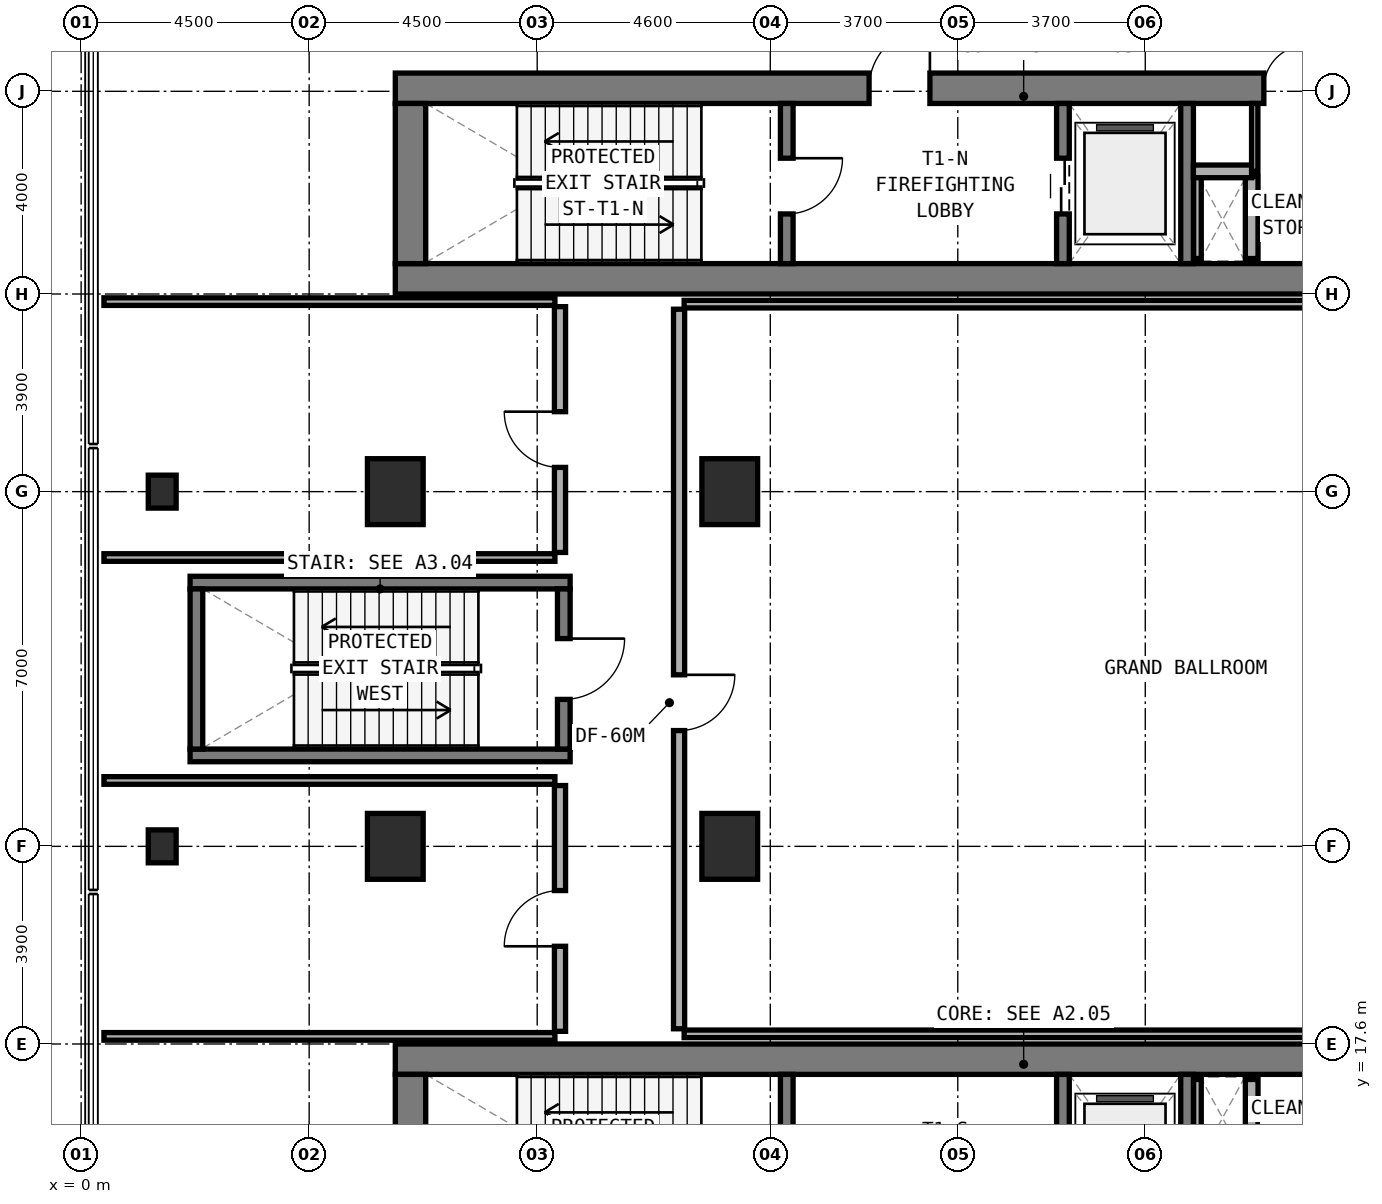
"""IFC4 building model, lengths in metres.
Left out: names, types, materials, properties, quantities, classifications, styles, units other than length and angle.
Written with IfcOpenShell. Run it as: python <this file> out.ifc"""

import sys

from ifc_helpers import new_model, si_unit, direction, frame, frame_2d, origin, origin_2d, place, context, subcontext, project, spatial, rectangle, extrude, element, fill, save


model = new_model("IFC4")
c1 = context("Model", 3, precision=1e-05, world=origin(), true_north=direction((0.0, 1.0)))
c2 = subcontext(c1, "Body", "Model", "MODEL_VIEW")
j1 = project(units=[si_unit("LENGTHUNIT", "METRE"), si_unit("PLANEANGLEUNIT", "RADIAN")], contexts=[c1])
p1 = place(None, origin())
s1 = spatial("IfcSite", under=j1, at=p1, CompositionType="ELEMENT")
p2 = place(p1, origin())
s2 = spatial("IfcBuilding", under=s1, at=p2, CompositionType="ELEMENT")
p3 = place(p2, frame((0.0, 0.0, 10.2)))
s3 = spatial("IfcBuildingStorey", under=s2, at=p3, CompositionType="ELEMENT", Elevation=10.2)
p4 = place(p3, frame((6.2, 32.7, 0.0), z_axis=(0.0, 0.0, 1.0), x_axis=(1.0, 0.0, 0.0)))
e1 = element("IfcWall", 1, at=p4, inside=s3, PredefinedType="SHEAR", context=c2, shape_type="SweptSolid", body=[
    extrude(rectangle(XDim=24.8, YDim=0.6, at=frame_2d((12.4, 0.0))), origin(), (0.0, 0.0, 1.0), 4.8),
])
p5 = place(p3, frame((6.2, 36.46, 0.0), z_axis=(0.0, 0.0, 1.0), x_axis=(1.0, 0.0, 0.0)))
e2 = element("IfcWall", 2, at=p5, inside=s3, PredefinedType="SHEAR", context=c2, shape_type="SweptSolid", body=[
    extrude(rectangle(XDim=24.8, YDim=0.6, at=frame_2d((12.4, 0.0))), origin(), (0.0, 0.0, 1.0), 4.8),
])
p6 = place(p5, frame((9.35, 0.0, 0.0)))
e3 = element("IfcOpeningElement", 3, at=p6, cuts=e2, PredefinedType="OPENING", context=c2, shape_type="SweptSolid", body=[
    extrude(rectangle(XDim=1.2, YDim=2.15, at=frame_2d((0.6, 1.075))), frame((0.0, 0.31, 0.0), z_axis=(0.0, -1.0, 0.0), x_axis=(1.0, 0.0, 0.0)), (0.0, 0.0, 1.0), 0.62),
])
p7 = place(p5, frame((17.14, 0.0, 0.0)))
e4 = element("IfcOpeningElement", 4, at=p7, cuts=e2, PredefinedType="OPENING", context=c2, shape_type="SweptSolid", body=[
    extrude(rectangle(XDim=0.85, YDim=2.1, at=frame_2d((0.425, 1.05))), frame((0.0, 0.31, 0.0), z_axis=(0.0, -1.0, 0.0), x_axis=(1.0, 0.0, 0.0)), (0.0, 0.0, 1.0), 0.62),
])
p8 = place(p5, frame((18.983, 0.0, 0.0)))
e5 = element("IfcOpeningElement", 5, at=p8, cuts=e2, PredefinedType="OPENING", context=c2, shape_type="SweptSolid", body=[
    extrude(rectangle(XDim=1.1, YDim=2.15, at=frame_2d((0.55, 1.075))), frame((0.0, 0.31, 0.0), z_axis=(0.0, -1.0, 0.0), x_axis=(1.0, 0.0, 0.0)), (0.0, 0.0, 1.0), 0.62),
])
p9 = place(p5, frame((20.85, 0.0, 0.0)))
e6 = element("IfcOpeningElement", 6, at=p9, cuts=e2, PredefinedType="OPENING", context=c2, shape_type="SweptSolid", body=[
    extrude(rectangle(XDim=1.1, YDim=2.15, at=frame_2d((0.55, 1.075))), frame((0.0, 0.31, 0.0), z_axis=(0.0, -1.0, 0.0), x_axis=(1.0, 0.0, 0.0)), (0.0, 0.0, 1.0), 0.62),
])
p10 = place(p5, frame((22.716, 0.0, 0.0)))
e7 = element("IfcOpeningElement", 7, at=p10, cuts=e2, PredefinedType="OPENING", context=c2, shape_type="SweptSolid", body=[
    extrude(rectangle(XDim=1.1, YDim=2.15, at=frame_2d((0.55, 1.075))), frame((0.0, 0.31, 0.0), z_axis=(0.0, -1.0, 0.0), x_axis=(1.0, 0.0, 0.0)), (0.0, 0.0, 1.0), 0.62),
])
p11 = place(p3, frame((6.5, 33.0, 0.0), z_axis=(0.0, 0.0, 1.0), x_axis=(0.0, 1.0, 0.0)))
e8 = element("IfcWall", 8, at=p11, inside=s3, PredefinedType="SHEAR", context=c2, shape_type="SweptSolid", body=[
    extrude(rectangle(XDim=3.16, YDim=0.6, at=frame_2d((1.58, 0.0))), origin(), (0.0, 0.0, 1.0), 4.8),
])
p12 = place(p3, frame((13.925, 33.0, 0.0), z_axis=(0.0, 0.0, 1.0), x_axis=(0.0, 1.0, 0.0)))
e9 = element("IfcWall", 9, at=p12, inside=s3, PredefinedType="STANDARD", context=c2, shape_type="SweptSolid", body=[
    extrude(rectangle(XDim=3.16, YDim=0.25, at=frame_2d((1.58, 0.0))), origin(), (0.0, 0.0, 1.0), 4.45),
])
p13 = place(p12, frame((0.98, 0.0, 0.0)))
e10 = element("IfcOpeningElement", 10, at=p13, cuts=e9, PredefinedType="OPENING", context=c2, shape_type="SweptSolid", body=[
    extrude(rectangle(XDim=1.1, YDim=2.15, at=frame_2d((0.55, 1.075))), frame((0.0, 0.135, 0.0), z_axis=(0.0, -1.0, 0.0), x_axis=(1.0, 0.0, 0.0)), (0.0, 0.0, 1.0), 0.27),
])
p14 = place(p3, frame((19.375, 33.0, 0.0), z_axis=(0.0, 0.0, 1.0), x_axis=(0.0, 1.0, 0.0)))
e11 = element("IfcWall", 11, at=p14, inside=s3, PredefinedType="STANDARD", context=c2, shape_type="SweptSolid", body=[
    extrude(rectangle(XDim=3.16, YDim=0.25, at=frame_2d((1.58, 0.0))), origin(), (0.0, 0.0, 1.0), 4.45),
])
p15 = place(p14, frame((0.98, 0.0, 0.0)))
e12 = element("IfcOpeningElement", 12, at=p15, cuts=e11, PredefinedType="OPENING", context=c2, shape_type="SweptSolid", body=[
    extrude(rectangle(XDim=1.1, YDim=2.15, at=frame_2d((0.55, 1.075))), frame((0.0, 0.135, 0.0), z_axis=(0.0, -1.0, 0.0), x_axis=(1.0, 0.0, 0.0)), (0.0, 0.0, 1.0), 0.27),
])
p16 = place(p3, frame((21.825, 33.0, 0.0), z_axis=(0.0, 0.0, 1.0), x_axis=(0.0, 1.0, 0.0)))
e13 = element("IfcWall", 13, at=p16, inside=s3, PredefinedType="STANDARD", context=c2, shape_type="SweptSolid", body=[
    extrude(rectangle(XDim=3.16, YDim=0.25, at=frame_2d((1.58, 0.0))), origin(), (0.0, 0.0, 1.0), 4.45),
])
p17 = place(p3, frame((6.2, 17.3, 0.0), z_axis=(0.0, 0.0, 1.0), x_axis=(1.0, 0.0, 0.0)))
e14 = element("IfcWall", 14, at=p17, inside=s3, PredefinedType="SHEAR", context=c2, shape_type="SweptSolid", body=[
    extrude(rectangle(XDim=24.8, YDim=0.6, at=frame_2d((12.4, 0.0))), origin(), (0.0, 0.0, 1.0), 4.8),
])
p18 = place(p3, frame((6.5, 13.84, 0.0), z_axis=(0.0, 0.0, 1.0), x_axis=(0.0, 1.0, 0.0)))
e15 = element("IfcWall", 15, at=p18, inside=s3, PredefinedType="SHEAR", context=c2, shape_type="SweptSolid", body=[
    extrude(rectangle(XDim=3.16, YDim=0.6, at=frame_2d((1.58, 0.0))), origin(), (0.0, 0.0, 1.0), 4.8),
])
p19 = place(p3, frame((13.925, 13.84, 0.0), z_axis=(0.0, 0.0, 1.0), x_axis=(0.0, 1.0, 0.0)))
e16 = element("IfcWall", 16, at=p19, inside=s3, PredefinedType="STANDARD", context=c2, shape_type="SweptSolid", body=[
    extrude(rectangle(XDim=3.16, YDim=0.25, at=frame_2d((1.58, 0.0))), origin(), (0.0, 0.0, 1.0), 4.45),
])
p20 = place(p19, frame((0.98, 0.0, 0.0)))
e17 = element("IfcOpeningElement", 17, at=p20, cuts=e16, PredefinedType="OPENING", context=c2, shape_type="SweptSolid", body=[
    extrude(rectangle(XDim=1.1, YDim=2.15, at=frame_2d((0.55, 1.075))), frame((0.0, 0.135, 0.0), z_axis=(0.0, -1.0, 0.0), x_axis=(1.0, 0.0, 0.0)), (0.0, 0.0, 1.0), 0.27),
])
p21 = place(p3, frame((19.375, 13.84, 0.0), z_axis=(0.0, 0.0, 1.0), x_axis=(0.0, 1.0, 0.0)))
e18 = element("IfcWall", 18, at=p21, inside=s3, PredefinedType="STANDARD", context=c2, shape_type="SweptSolid", body=[
    extrude(rectangle(XDim=3.16, YDim=0.25, at=frame_2d((1.58, 0.0))), origin(), (0.0, 0.0, 1.0), 4.45),
])
p22 = place(p21, frame((0.98, 0.0, 0.0)))
e19 = element("IfcOpeningElement", 19, at=p22, cuts=e18, PredefinedType="OPENING", context=c2, shape_type="SweptSolid", body=[
    extrude(rectangle(XDim=1.1, YDim=2.15, at=frame_2d((0.55, 1.075))), frame((0.0, 0.135, 0.0), z_axis=(0.0, -1.0, 0.0), x_axis=(1.0, 0.0, 0.0)), (0.0, 0.0, 1.0), 0.27),
])
p23 = place(p3, frame((21.825, 13.84, 0.0), z_axis=(0.0, 0.0, 1.0), x_axis=(0.0, 1.0, 0.0)))
e20 = element("IfcWall", 20, at=p23, inside=s3, PredefinedType="STANDARD", context=c2, shape_type="SweptSolid", body=[
    extrude(rectangle(XDim=3.16, YDim=0.25, at=frame_2d((1.58, 0.0))), origin(), (0.0, 0.0, 1.0), 4.45),
])
for number, where, z_axis, x_axis in (
    (21, (2.15, 23.295, 0.0), (0.0, 0.0, 1.0), (1.0, 0.0, 0.0)),
    (22, (2.15, 26.705, 0.0), (0.0, 0.0, 1.0), (1.0, 0.0, 0.0)),
):
    element("IfcWall", number, at=place(p3, frame(where, z_axis=z_axis, x_axis=x_axis)), inside=s3, PredefinedType="STANDARD", context=c2, shape_type="SweptSolid", body=[
        extrude(rectangle(XDim=7.5, YDim=0.25, at=frame_2d((3.75, 0.0))), origin(), (0.0, 0.0, 1.0), 4.8),
    ])
p24 = place(p3, frame((2.275, 23.42, 0.0), z_axis=(0.0, 0.0, 1.0), x_axis=(0.0, 1.0, 0.0)))
e23 = element("IfcWall", 23, at=p24, inside=s3, PredefinedType="STANDARD", context=c2, shape_type="SweptSolid", body=[
    extrude(rectangle(XDim=3.16, YDim=0.25, at=frame_2d((1.58, 0.0))), origin(), (0.0, 0.0, 1.0), 4.8),
])
p25 = place(p3, frame((9.525, 23.42, 0.0), z_axis=(0.0, 0.0, 1.0), x_axis=(0.0, 1.0, 0.0)))
e24 = element("IfcWall", 24, at=p25, inside=s3, PredefinedType="STANDARD", context=c2, shape_type="SweptSolid", body=[
    extrude(rectangle(XDim=3.16, YDim=0.25, at=frame_2d((1.58, 0.0))), origin(), (0.0, 0.0, 1.0), 4.8),
])
p26 = place(p25, frame((0.98, 0.0, 0.0)))
e25 = element("IfcOpeningElement", 25, at=p26, cuts=e24, PredefinedType="OPENING", context=c2, shape_type="SweptSolid", body=[
    extrude(rectangle(XDim=1.2, YDim=2.15, at=frame_2d((0.6, 1.075))), frame((0.0, 0.135, 0.0), z_axis=(0.0, -1.0, 0.0), x_axis=(1.0, 0.0, 0.0)), (0.0, 0.0, 1.0), 0.27),
])
for number, where, z_axis, x_axis in (
    (26, (6.2, 21.5, 0.0), (0.0, 0.0, 1.0), (1.0, 0.0, 0.0)),
    (27, (6.2, 28.5, 0.0), (0.0, 0.0, 1.0), (1.0, 0.0, 0.0)),
    (28, (12.8, 21.5, 0.0), (0.0, 0.0, 1.0), (1.0, 0.0, 0.0)),
    (29, (12.8, 28.5, 0.0), (0.0, 0.0, 1.0), (1.0, 0.0, 0.0)),
):
    element("IfcColumn", number, at=place(p3, frame(where, z_axis=z_axis, x_axis=x_axis)), inside=s3, PredefinedType="COLUMN", context=c2, shape_type="SweptSolid", body=[
        extrude(rectangle(XDim=1.1, YDim=1.3, at=origin_2d()), origin(), (0.0, 0.0, 1.0), 4.8),
    ])
for number, where, z_axis, x_axis in (
    (30, (1.6, 21.5, 0.0), (0.0, 0.0, 1.0), (1.0, 0.0, 0.0)),
    (31, (1.6, 28.5, 0.0), (0.0, 0.0, 1.0), (1.0, 0.0, 0.0)),
):
    element("IfcColumn", number, at=place(p3, frame(where, z_axis=z_axis, x_axis=x_axis)), inside=s3, PredefinedType="PILASTER", context=c2, shape_type="SweptSolid", body=[
        extrude(rectangle(XDim=0.55, YDim=0.65, at=origin_2d()), origin(), (0.0, 0.0, 1.0), 4.8),
    ])
p27 = place(p3, frame((22.03, 33.1, 0.0), z_axis=(0.0, 0.0, 1.0), x_axis=(0.0, 1.0, 0.0)))
e32 = element("IfcWall", 32, at=p27, inside=s3, PredefinedType="PARTITIONING", context=c2, shape_type="SweptSolid", body=[
    extrude(rectangle(XDim=1.62, YDim=0.15, at=frame_2d((0.81, 0.0))), origin(), (0.0, 0.0, 1.0), 4.45),
])
p28 = place(p3, frame((23.1, 33.1, 0.0), z_axis=(0.0, 0.0, 1.0), x_axis=(0.0, 1.0, 0.0)))
e33 = element("IfcWall", 33, at=p28, inside=s3, PredefinedType="SOLIDWALL", context=c2, shape_type="SweptSolid", body=[
    extrude(rectangle(XDim=1.62, YDim=0.25, at=frame_2d((0.81, 0.0))), origin(), (0.0, 0.0, 1.0), 4.45),
])
p29 = place(p3, frame((21.95, 34.82, 0.0), z_axis=(0.0, 0.0, 1.0), x_axis=(1.0, 0.0, 0.0)))
e34 = element("IfcWall", 34, at=p29, inside=s3, PredefinedType="SOLIDWALL", context=c2, shape_type="SweptSolid", body=[
    extrude(rectangle(XDim=1.15, YDim=0.25, at=frame_2d((0.575, 0.0))), origin(), (0.0, 0.0, 1.0), 4.45),
])
p30 = place(p3, frame((23.16, 34.82, 0.0), z_axis=(0.0, 0.0, 1.0), x_axis=(0.0, 1.0, 0.0)))
e35 = element("IfcWall", 35, at=p30, inside=s3, PredefinedType="PARTITIONING", context=c2, shape_type="SweptSolid", body=[
    extrude(rectangle(XDim=1.34, YDim=0.125, at=frame_2d((0.67, 0.0))), origin(), (0.0, 0.0, 1.0), 4.45),
])
p31 = place(p3, frame((22.03, 15.28, 0.0), z_axis=(0.0, 0.0, 1.0), x_axis=(0.0, 1.0, 0.0)))
e36 = element("IfcWall", 36, at=p31, inside=s3, PredefinedType="PARTITIONING", context=c2, shape_type="SweptSolid", body=[
    extrude(rectangle(XDim=1.62, YDim=0.15, at=frame_2d((0.81, 0.0))), origin(), (0.0, 0.0, 1.0), 4.45),
])
p32 = place(p3, frame((23.1, 15.28, 0.0), z_axis=(0.0, 0.0, 1.0), x_axis=(0.0, 1.0, 0.0)))
e37 = element("IfcWall", 37, at=p32, inside=s3, PredefinedType="SOLIDWALL", context=c2, shape_type="SweptSolid", body=[
    extrude(rectangle(XDim=1.62, YDim=0.25, at=frame_2d((0.81, 0.0))), origin(), (0.0, 0.0, 1.0), 4.45),
])
for number, where, z_axis, x_axis in (
    (38, (11.9, 17.8, 0.0), (0.0, 0.0, 1.0), (1.0, 0.0, 0.0)),
    (39, (11.9, 32.2, 0.0), (0.0, 0.0, 1.0), (1.0, 0.0, 0.0)),
):
    element("IfcWall", number, at=place(p3, frame(where, z_axis=z_axis, x_axis=x_axis)), inside=s3, PredefinedType="PARTITIONING", context=c2, shape_type="SweptSolid", body=[
        extrude(rectangle(XDim=19.8, YDim=0.15, at=frame_2d((9.9, 0.0))), origin(), (0.0, 0.0, 1.0), 3.525),
    ])
p33 = place(p3, frame((11.8, 17.9, 0.0), z_axis=(0.0, 0.0, 1.0), x_axis=(0.0, 1.0, 0.0)))
e40 = element("IfcWall", 40, at=p33, inside=s3, PredefinedType="SOLIDWALL", context=c2, shape_type="SweptSolid", body=[
    extrude(rectangle(XDim=14.2, YDim=0.22, at=frame_2d((7.1, 0.0))), origin(), (0.0, 0.0, 1.0), 3.525),
])
p34 = place(p33, frame((5.885, 0.0, 0.0)))
e41 = element("IfcOpeningElement", 41, at=p34, cuts=e40, PredefinedType="OPENING", context=c2, shape_type="SweptSolid", body=[
    extrude(rectangle(XDim=1.1, YDim=2.1, at=frame_2d((0.55, 1.05))), frame((0.0, 0.12, 0.0), z_axis=(0.0, -1.0, 0.0), x_axis=(1.0, 0.0, 0.0)), (0.0, 0.0, 1.0), 0.24),
])
p35 = place(p3, frame((0.45, 17.75, 0.0), z_axis=(0.0, 0.0, 1.0), x_axis=(1.0, 0.0, 0.0)))
e42 = element("IfcWall", 42, at=p35, inside=s3, PredefinedType="PARTITIONING", context=c2, shape_type="SweptSolid", body=[
    extrude(rectangle(XDim=8.9, YDim=0.15, at=frame_2d((4.45, 0.0))), origin(), (0.0, 0.0, 1.0), 3.725),
])
p36 = place(p3, frame((0.45, 22.8, 0.0), z_axis=(0.0, 0.0, 1.0), x_axis=(1.0, 0.0, 0.0)))
e43 = element("IfcWall", 43, at=p36, inside=s3, PredefinedType="PARTITIONING", context=c2, shape_type="SweptSolid", body=[
    extrude(rectangle(XDim=8.9, YDim=0.15, at=frame_2d((4.45, 0.0))), origin(), (0.0, 0.0, 1.0), 3.925),
])
p37 = place(p3, frame((9.45, 17.85, 0.0), z_axis=(0.0, 0.0, 1.0), x_axis=(0.0, 1.0, 0.0)))
e44 = element("IfcWall", 44, at=p37, inside=s3, PredefinedType="SOLIDWALL", context=c2, shape_type="SweptSolid", body=[
    extrude(rectangle(XDim=4.85, YDim=0.22, at=frame_2d((2.425, 0.0))), origin(), (0.0, 0.0, 1.0), 3.525),
])
p38 = place(p37, frame((1.678, 0.0, 0.0)))
e45 = element("IfcOpeningElement", 45, at=p38, cuts=e44, PredefinedType="OPENING", context=c2, shape_type="SweptSolid", body=[
    extrude(rectangle(XDim=1.1, YDim=2.1, at=frame_2d((0.55, 1.05))), frame((0.0, 0.12, 0.0), z_axis=(0.0, -1.0, 0.0), x_axis=(1.0, 0.0, 0.0)), (0.0, 0.0, 1.0), 0.24),
])
p39 = place(p3, frame((0.45, 27.2, 0.0), z_axis=(0.0, 0.0, 1.0), x_axis=(1.0, 0.0, 0.0)))
e46 = element("IfcWall", 46, at=p39, inside=s3, PredefinedType="PARTITIONING", context=c2, shape_type="SweptSolid", body=[
    extrude(rectangle(XDim=8.9, YDim=0.15, at=frame_2d((4.45, 0.0))), origin(), (0.0, 0.0, 1.0), 3.925),
])
p40 = place(p3, frame((0.45, 32.25, 0.0), z_axis=(0.0, 0.0, 1.0), x_axis=(1.0, 0.0, 0.0)))
e47 = element("IfcWall", 47, at=p40, inside=s3, PredefinedType="PARTITIONING", context=c2, shape_type="SweptSolid", body=[
    extrude(rectangle(XDim=8.9, YDim=0.15, at=frame_2d((4.45, 0.0))), origin(), (0.0, 0.0, 1.0), 3.725),
])
p41 = place(p3, frame((9.45, 27.3, 0.0), z_axis=(0.0, 0.0, 1.0), x_axis=(0.0, 1.0, 0.0)))
e48 = element("IfcWall", 48, at=p41, inside=s3, PredefinedType="SOLIDWALL", context=c2, shape_type="SweptSolid", body=[
    extrude(rectangle(XDim=4.85, YDim=0.22, at=frame_2d((2.425, 0.0))), origin(), (0.0, 0.0, 1.0), 3.525),
])
p42 = place(p41, frame((1.678, 0.0, 0.0)))
e49 = element("IfcOpeningElement", 49, at=p42, cuts=e48, PredefinedType="OPENING", context=c2, shape_type="SweptSolid", body=[
    extrude(rectangle(XDim=1.1, YDim=2.1, at=frame_2d((0.55, 1.05))), frame((0.0, 0.12, 0.0), z_axis=(0.0, -1.0, 0.0), x_axis=(1.0, 0.0, 0.0)), (0.0, 0.0, 1.0), 0.24),
])
p43 = place(p13, frame((1.1, 0.0, 0.0), z_axis=(0.0, 0.0, 1.0), x_axis=(-1.0, 0.0, 0.0)))
e50 = element("IfcDoor", 50, at=p43, inside=s3, OperationType="SINGLE_SWING_LEFT", PredefinedType="DOOR", context=c2, shape_type="SweptSolid", body=[
    extrude(rectangle(XDim=1.1, YDim=2.15, at=frame_2d((0.55, 1.075))), frame((0.0, 0.025, 0.0), z_axis=(0.0, -1.0, 0.0), x_axis=(1.0, 0.0, 0.0)), (0.0, 0.0, 1.0), 0.05),
])
fill(e10, e50)
p44 = place(p6, origin())
e51 = element("IfcDoor", 51, at=p44, inside=s3, OperationType="SINGLE_SWING_RIGHT", PredefinedType="DOOR", context=c2, shape_type="SweptSolid", body=[
    extrude(rectangle(XDim=1.2, YDim=2.15, at=frame_2d((0.6, 1.075))), frame((0.0, 0.025, 0.0), z_axis=(0.0, -1.0, 0.0), x_axis=(1.0, 0.0, 0.0)), (0.0, 0.0, 1.0), 0.05),
])
fill(e3, e51)
p45 = place(p15, origin())
e52 = element("IfcDoor", 52, at=p45, inside=s3, OperationType="DOUBLE_DOOR_SLIDING", PredefinedType="DOOR", context=c2, shape_type="SweptSolid", body=[
    extrude(rectangle(XDim=1.1, YDim=2.15, at=frame_2d((0.55, 1.075))), frame((0.0, 0.025, 0.0), z_axis=(0.0, -1.0, 0.0), x_axis=(1.0, 0.0, 0.0)), (0.0, 0.0, 1.0), 0.05),
])
fill(e12, e52)
p46 = place(p7, origin())
e53 = element("IfcDoor", 53, at=p46, inside=s3, OperationType="SINGLE_SWING_RIGHT", PredefinedType="DOOR", context=c2, shape_type="SweptSolid", body=[
    extrude(rectangle(XDim=0.85, YDim=2.1, at=frame_2d((0.425, 1.05))), frame((0.0, 0.025, 0.0), z_axis=(0.0, -1.0, 0.0), x_axis=(1.0, 0.0, 0.0)), (0.0, 0.0, 1.0), 0.05),
])
fill(e4, e53)
p47 = place(p26, frame((1.2, 0.0, 0.0), z_axis=(0.0, 0.0, 1.0), x_axis=(-1.0, 0.0, 0.0)))
e54 = element("IfcDoor", 54, at=p47, inside=s3, OperationType="SINGLE_SWING_LEFT", PredefinedType="DOOR", context=c2, shape_type="SweptSolid", body=[
    extrude(rectangle(XDim=1.2, YDim=2.15, at=frame_2d((0.6, 1.075))), frame((0.0, 0.025, 0.0), z_axis=(0.0, -1.0, 0.0), x_axis=(1.0, 0.0, 0.0)), (0.0, 0.0, 1.0), 0.05),
])
fill(e25, e54)
p48 = place(p34, frame((1.1, 0.0, 0.0), z_axis=(0.0, 0.0, 1.0), x_axis=(-1.0, 0.0, 0.0)))
e55 = element("IfcDoor", 55, at=p48, inside=s3, OperationType="SINGLE_SWING_LEFT", PredefinedType="DOOR", context=c2, shape_type="SweptSolid", body=[
    extrude(rectangle(XDim=1.1, YDim=2.1, at=frame_2d((0.55, 1.05))), frame((0.0, 0.025, 0.0), z_axis=(0.0, -1.0, 0.0), x_axis=(1.0, 0.0, 0.0)), (0.0, 0.0, 1.0), 0.05),
])
fill(e41, e55)
p49 = place(p38, origin())
e56 = element("IfcDoor", 56, at=p49, inside=s3, OperationType="SINGLE_SWING_LEFT", PredefinedType="DOOR", context=c2, shape_type="SweptSolid", body=[
    extrude(rectangle(XDim=1.1, YDim=2.1, at=frame_2d((0.55, 1.05))), frame((0.0, 0.025, 0.0), z_axis=(0.0, -1.0, 0.0), x_axis=(1.0, 0.0, 0.0)), (0.0, 0.0, 1.0), 0.05),
])
fill(e45, e56)
p50 = place(p42, origin())
e57 = element("IfcDoor", 57, at=p50, inside=s3, OperationType="SINGLE_SWING_RIGHT", PredefinedType="DOOR", context=c2, shape_type="SweptSolid", body=[
    extrude(rectangle(XDim=1.1, YDim=2.1, at=frame_2d((0.55, 1.05))), frame((0.0, 0.025, 0.0), z_axis=(0.0, -1.0, 0.0), x_axis=(1.0, 0.0, 0.0)), (0.0, 0.0, 1.0), 0.05),
])
fill(e49, e57)
save(model, sys.argv[1])
